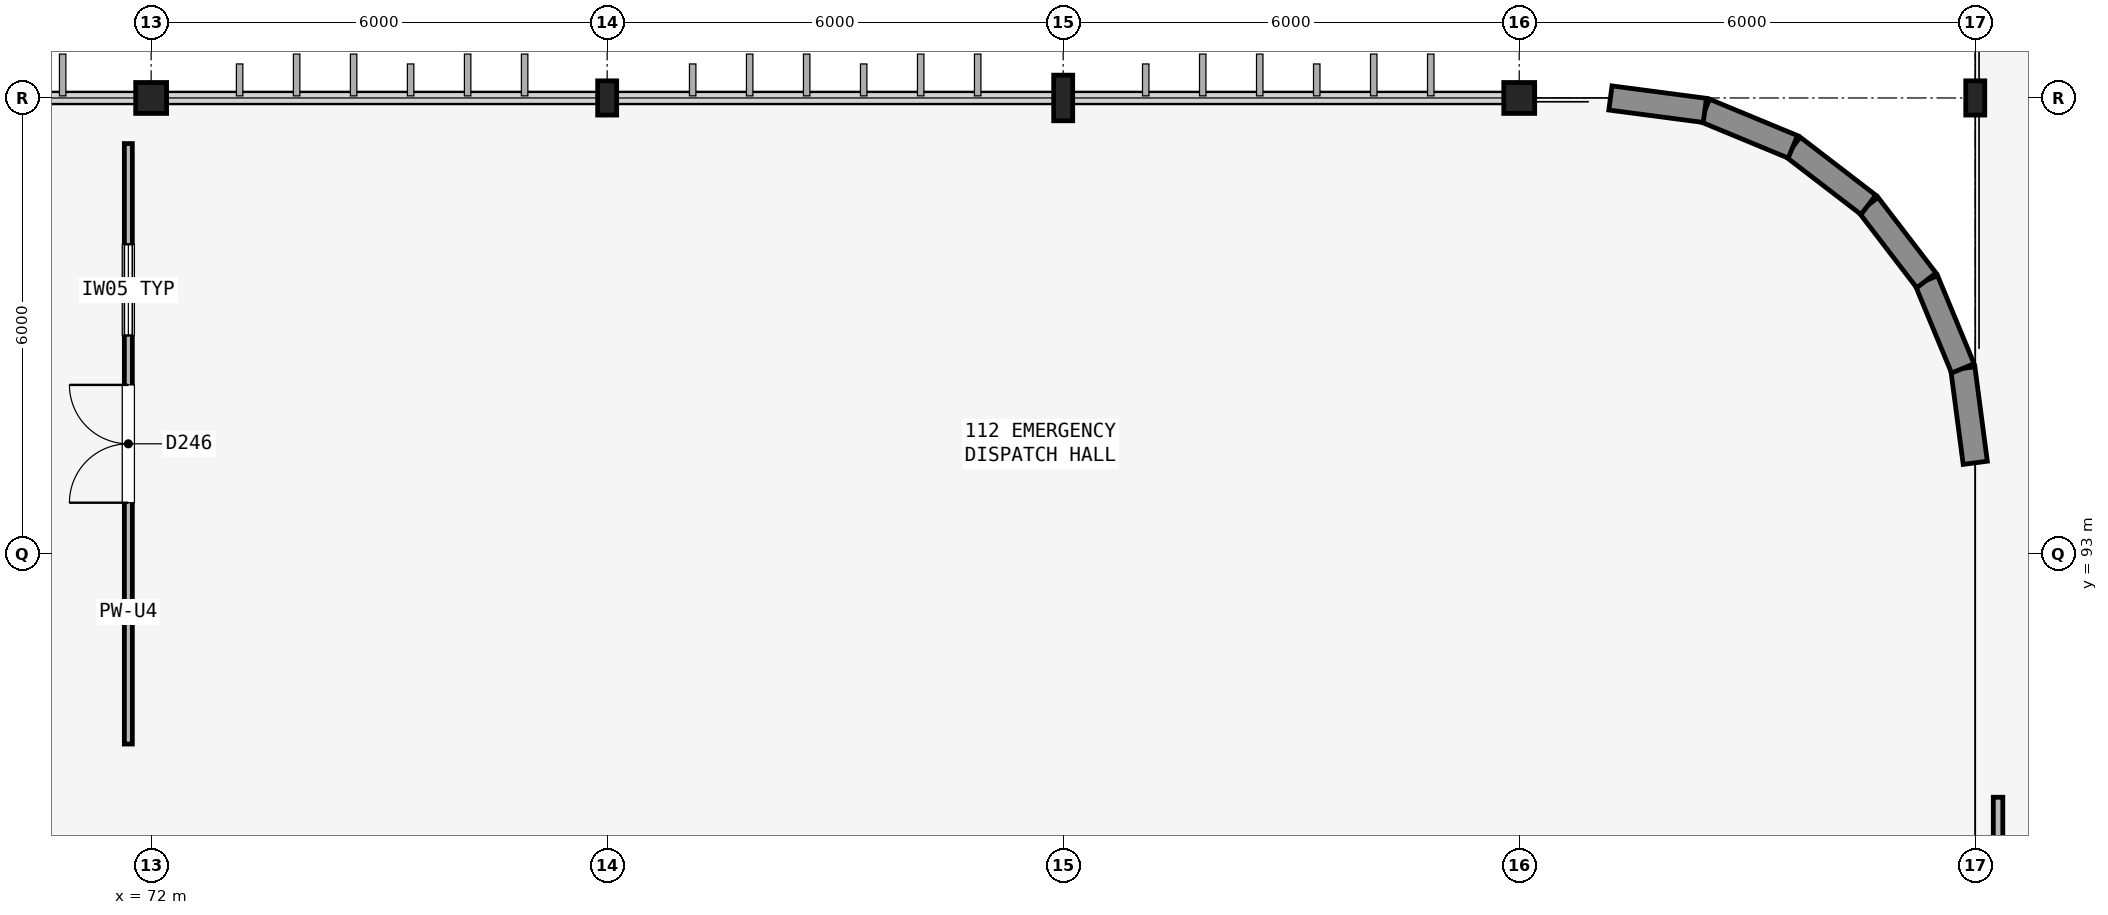
"""IFC4 building model, lengths in metres.
Left out: names, types, materials, properties, quantities, classifications, styles, units other than length and angle.
Written with IfcOpenShell. Run it as: python <this file> out.ifc"""

import sys

from ifc_helpers import new_model, si_unit, direction, frame, frame_2d, origin, origin_2d, place, context, subcontext, project, spatial, rectangle, hollow_circle, i_section, extrude, element, fill, save


model = new_model("IFC4")
c1 = context("Model", 3, precision=1e-05, world=origin(), true_north=direction((0.0, 1.0)))
c2 = subcontext(c1, "Body", "Model", "MODEL_VIEW")
j1 = project(units=[si_unit("LENGTHUNIT", "METRE"), si_unit("PLANEANGLEUNIT", "RADIAN")], contexts=[c1])
p1 = place(None, origin())
s1 = spatial("IfcSite", under=j1, at=p1, CompositionType="ELEMENT")
p2 = place(p1, origin())
s2 = spatial("IfcBuilding", under=s1, at=p2, CompositionType="ELEMENT")
p3 = place(p2, frame((0.0, 0.0, 13.5)))
s3 = spatial("IfcBuildingStorey", under=s2, at=p3, CompositionType="ELEMENT", Elevation=13.5)
p4 = place(p3, frame((72.0, 99.0, 0.0), z_axis=(0.0, 0.0, 1.0), x_axis=(1.0, 0.0, 0.0)))
e1 = element("IfcColumn", 1, at=p4, inside=s3, PredefinedType="COLUMN", context=c2, shape_type="SweptSolid", body=[
    extrude(hollow_circle(Radius=0.203, WallThickness=0.016, at=origin_2d()), origin(), (0.0, 0.0, 1.0), 4.5),
])
p5 = place(p3, frame((78.0, 99.0, 0.0), z_axis=(0.0, 0.0, 1.0), x_axis=(1.0, 0.0, 0.0)))
e2 = element("IfcColumn", 2, at=p5, inside=s3, PredefinedType="COLUMN", context=c2, shape_type="SweptSolid", body=[
    extrude(i_section(OverallWidth=0.25, OverallDepth=0.45, WebThickness=0.011, FlangeThickness=0.014, FilletRadius=0.015, at=origin_2d()), origin(), (0.0, 0.0, 1.0), 4.5),
])
p6 = place(p3, frame((84.0, 99.0, 0.0), z_axis=(0.0, 0.0, 1.0), x_axis=(1.0, 0.0, 0.0)))
e3 = element("IfcColumn", 3, at=p6, inside=s3, PredefinedType="COLUMN", context=c2, shape_type="SweptSolid", body=[
    extrude(i_section(OverallWidth=0.25, OverallDepth=0.6, WebThickness=0.012, FlangeThickness=0.024, FilletRadius=0.017, at=origin_2d()), origin(), (0.0, 0.0, 1.0), 4.5),
])
p7 = place(p3, frame((90.0, 99.0, 0.0), z_axis=(0.0, 0.0, 1.0), x_axis=(1.0, 0.0, 0.0)))
e4 = element("IfcColumn", 4, at=p7, inside=s3, PredefinedType="COLUMN", context=c2, shape_type="SweptSolid", body=[
    extrude(hollow_circle(Radius=0.203, WallThickness=0.016, at=origin_2d()), origin(), (0.0, 0.0, 1.0), 4.5),
])
p8 = place(p3, frame((96.0, 99.0, 0.0), z_axis=(0.0, 0.0, 1.0), x_axis=(1.0, 0.0, 0.0)))
e5 = element("IfcColumn", 5, at=p8, inside=s3, PredefinedType="COLUMN", context=c2, shape_type="SweptSolid", body=[
    extrude(i_section(OverallWidth=0.25, OverallDepth=0.45, WebThickness=0.011, FlangeThickness=0.014, FilletRadius=0.015, at=origin_2d()), origin(), (0.0, 0.0, 1.0), 4.5),
])
for number, where, z_axis, x_axis in (
    (6, (96.0, 94.2, 0.0), (0.0, 0.0, 1.0), (-0.131, 0.991, 0.0)),
    (7, (95.836, 95.442, 0.0), (0.0, 0.0, 1.0), (-0.383, 0.924, 0.0)),
):
    element("IfcWall", number, at=place(p3, frame(where, z_axis=z_axis, x_axis=x_axis)), inside=s3, PredefinedType="SOLIDWALL", context=c2, shape_type="SweptSolid", body=[
        extrude(rectangle(XDim=1.253, YDim=0.32, at=frame_2d((0.626, 0.0))), origin(), (0.0, 0.0, 1.0), 3.39),
    ])
for number, where, z_axis, x_axis in (
    (8, (95.357, 96.6, 0.0), (0.0, 0.0, 1.0), (-0.609, 0.793, 0.0)),
    (9, (94.594, 97.594, 0.0), (0.0, 0.0, 1.0), (-0.793, 0.609, 0.0)),
):
    element("IfcWall", number, at=place(p3, frame(where, z_axis=z_axis, x_axis=x_axis)), inside=s3, PredefinedType="SOLIDWALL", context=c2, shape_type="SweptSolid", body=[
        extrude(rectangle(XDim=1.253, YDim=0.32, at=frame_2d((0.626, 0.0))), origin(), (0.0, 0.0, 1.0), 4.195),
    ])
for number, where, z_axis, x_axis in (
    (10, (93.6, 98.357, 0.0), (0.0, 0.0, 1.0), (-0.924, 0.383, 0.0)),
    (11, (92.442, 98.836, 0.0), (0.0, 0.0, 1.0), (-0.991, 0.131, 0.0)),
):
    element("IfcWall", number, at=place(p3, frame(where, z_axis=z_axis, x_axis=x_axis)), inside=s3, PredefinedType="SOLIDWALL", context=c2, shape_type="SweptSolid", body=[
        extrude(rectangle(XDim=1.253, YDim=0.32, at=frame_2d((0.626, 0.0))), origin(), (0.0, 0.0, 1.0), 3.89),
    ])
p9 = place(p3, frame((71.7, 90.5, 0.0), z_axis=(0.0, 0.0, 1.0), x_axis=(0.0, 1.0, 0.0)))
e12 = element("IfcWall", 12, at=p9, inside=s3, PredefinedType="PARTITIONING", context=c2, shape_type="SweptSolid", body=[
    extrude(rectangle(XDim=7.9, YDim=0.105, at=frame_2d((3.95, 0.0))), origin(), (0.0, 0.0, 1.0), 3.09),
])
p10 = place(p9, frame((3.175, 0.0, 0.0)))
e13 = element("IfcOpeningElement", 13, at=p10, cuts=e12, PredefinedType="OPENING", context=c2, shape_type="SweptSolid", body=[
    extrude(rectangle(XDim=1.55, YDim=2.2, at=frame_2d((0.775, 1.1))), frame((0.0, 0.062, 0.0), z_axis=(0.0, -1.0, 0.0), x_axis=(1.0, 0.0, 0.0)), (0.0, 0.0, 1.0), 0.125),
])
p11 = place(p9, frame((5.375, 0.0, 1.15)))
e14 = element("IfcOpeningElement", 14, at=p11, cuts=e12, PredefinedType="OPENING", context=c2, shape_type="SweptSolid", body=[
    extrude(rectangle(XDim=1.2, YDim=0.9, at=frame_2d((0.6, 0.45))), frame((0.0, 0.062, 0.0), z_axis=(0.0, -1.0, 0.0), x_axis=(1.0, 0.0, 0.0)), (0.0, 0.0, 1.0), 0.125),
])
p12 = place(p3, frame((96.3, 69.5, 0.0), z_axis=(0.0, 0.0, 1.0), x_axis=(0.0, 1.0, 0.0)))
e15 = element("IfcWall", 15, at=p12, inside=s3, PredefinedType="PARTITIONING", context=c2, shape_type="SweptSolid", body=[
    extrude(rectangle(XDim=20.3, YDim=0.125, at=frame_2d((10.15, 0.0))), origin(), (0.0, 0.0, 1.0), 3.39),
])
p13 = place(p12, frame((9.375, 0.0, 0.0)))
e16 = element("IfcOpeningElement", 16, at=p13, cuts=e15, PredefinedType="OPENING", context=c2, shape_type="SweptSolid", body=[
    extrude(rectangle(XDim=1.55, YDim=2.2, at=frame_2d((0.775, 1.1))), frame((0.0, 0.073, 0.0), z_axis=(0.0, -1.0, 0.0), x_axis=(1.0, 0.0, 0.0)), (0.0, 0.0, 1.0), 0.145),
])
p14 = place(p10, origin())
e17 = element("IfcDoor", 17, at=p14, inside=s3, OperationType="DOUBLE_DOOR_SINGLE_SWING", PredefinedType="DOOR", context=c2, shape_type="SweptSolid", body=[
    extrude(rectangle(XDim=1.55, YDim=2.2, at=frame_2d((0.775, 1.1))), frame((0.0, 0.025, 0.0), z_axis=(0.0, -1.0, 0.0), x_axis=(1.0, 0.0, 0.0)), (0.0, 0.0, 1.0), 0.05),
])
fill(e13, e17)
p15 = place(p11, origin())
e18 = element("IfcWindow", 18, at=p15, inside=s3, PartitioningType="SINGLE_PANEL", PredefinedType="WINDOW", context=c2, shape_type="SweptSolid", body=[
    extrude(rectangle(XDim=1.2, YDim=0.9, at=frame_2d((0.6, 0.45))), frame((0.0, 0.03, 0.0), z_axis=(0.0, -1.0, 0.0), x_axis=(1.0, 0.0, 0.0)), (0.0, 0.0, 1.0), 0.06),
])
fill(e14, e18)
save(model, sys.argv[1])
